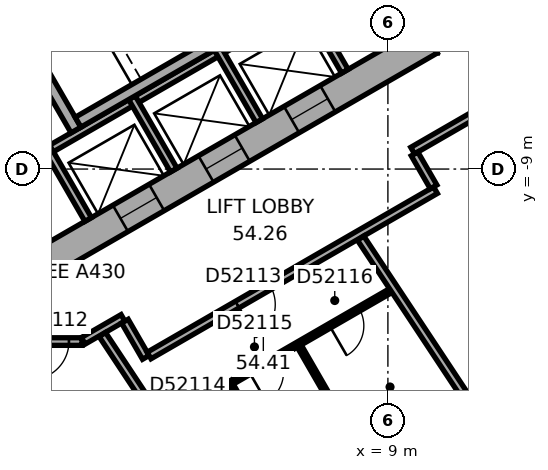
"""IFC4 building model, lengths in metres.
Left out: names, types, materials, properties, quantities, classifications, styles, units other than length and angle.
Written with IfcOpenShell. Run it as: python <this file> out.ifc"""

import sys

from ifc_helpers import new_model, si_unit, direction, frame, frame_2d, origin, place, context, subcontext, project, spatial, rectangle, extrude, element, fill, save


model = new_model("IFC4")
c1 = context("Model", 3, precision=1e-05, world=origin(), true_north=direction((0.0, 1.0)))
c2 = subcontext(c1, "Body", "Model", "MODEL_VIEW")
j1 = project(units=[si_unit("LENGTHUNIT", "METRE"), si_unit("PLANEANGLEUNIT", "RADIAN")], contexts=[c1])
p1 = place(None, origin())
s1 = spatial("IfcSite", under=j1, at=p1, CompositionType="ELEMENT")
p2 = place(p1, origin())
s2 = spatial("IfcBuilding", under=s1, at=p2, CompositionType="ELEMENT")
p3 = place(p2, frame((0.0, 0.0, 221.7)))
s3 = spatial("IfcBuildingStorey", under=s2, at=p3, CompositionType="ELEMENT", Elevation=221.7)
p4 = place(p3, frame((9.9, -5.947, 0.0), z_axis=(0.0, 0.0, 1.0), x_axis=(0.0, 1.0, 0.0)))
e1 = element("IfcWall", 1, at=p4, inside=s3, PredefinedType="SHEAR", context=c2, shape_type="SweptSolid", body=[
    extrude(rectangle(XDim=11.894, YDim=0.8, at=frame_2d((5.947, 0.0))), origin(), (0.0, 0.0, 1.0), 3.7),
])
p5 = place(p4, frame((6.147, 0.0, 0.0)))
e2 = element("IfcOpeningElement", 2, at=p5, cuts=e1, PredefinedType="OPENING", context=c2, shape_type="SweptSolid", body=[
    extrude(rectangle(XDim=1.5, YDim=2.1, at=frame_2d((0.75, 1.05))), frame((0.0, 0.41, 0.0), z_axis=(0.0, -1.0, 0.0), x_axis=(1.0, 0.0, 0.0)), (0.0, 0.0, 1.0), 0.82),
])
p6 = place(p4, frame((2.997, 0.0, 0.0)))
e3 = element("IfcOpeningElement", 3, at=p6, cuts=e1, PredefinedType="OPENING", context=c2, shape_type="SweptSolid", body=[
    extrude(rectangle(XDim=0.9, YDim=2.1, at=frame_2d((0.45, 1.05))), frame((0.0, 0.41, 0.0), z_axis=(0.0, -1.0, 0.0), x_axis=(1.0, 0.0, 0.0)), (0.0, 0.0, 1.0), 0.82),
])
p7 = place(p3, frame((-10.1, -5.6, 0.0), z_axis=(0.0, 0.0, 1.0), x_axis=(0.866023897231, -0.500002609418, 0.0)))
e4 = element("IfcWall", 4, at=p7, inside=s3, PredefinedType="SHEAR", context=c2, shape_type="SweptSolid", body=[
    extrude(rectangle(XDim=11.894, YDim=0.8, at=frame_2d((5.947, 0.0))), origin(), (0.0, 0.0, 1.0), 3.7),
])
p8 = place(p7, frame((6.147, 0.0, 0.0)))
e5 = element("IfcOpeningElement", 5, at=p8, cuts=e4, PredefinedType="OPENING", context=c2, shape_type="SweptSolid", body=[
    extrude(rectangle(XDim=1.5, YDim=2.1, at=frame_2d((0.75, 1.05))), frame((0.0, 0.41, 0.0), z_axis=(0.0, -1.0, 0.0), x_axis=(1.0, 0.0, 0.0)), (0.0, 0.0, 1.0), 0.82),
])
p9 = place(p7, frame((1.597, 0.0, 0.0)))
e6 = element("IfcOpeningElement", 6, at=p9, cuts=e4, PredefinedType="OPENING", context=c2, shape_type="SweptSolid", body=[
    extrude(rectangle(XDim=1.1, YDim=2.1, at=frame_2d((0.55, 1.05))), frame((0.0, 0.41, 0.0), z_axis=(0.0, -1.0, 0.0), x_axis=(1.0, 0.0, 0.0)), (0.0, 0.0, 1.0), 0.82),
])
p10 = place(p7, frame((4.197, 0.0, 0.0)))
e7 = element("IfcOpeningElement", 7, at=p10, cuts=e4, PredefinedType="OPENING", context=c2, shape_type="SweptSolid", body=[
    extrude(rectangle(XDim=1.1, YDim=2.1, at=frame_2d((0.55, 1.05))), frame((0.0, 0.41, 0.0), z_axis=(0.0, -1.0, 0.0), x_axis=(1.0, 0.0, 0.0)), (0.0, 0.0, 1.0), 0.82),
])
p11 = place(p3, frame((-0.2, -11.547, 0.0), z_axis=(0.0, 0.0, 1.0), x_axis=(0.866023897231, 0.500002609418, 0.0)))
e8 = element("IfcWall", 8, at=p11, inside=s3, PredefinedType="SHEAR", context=c2, shape_type="SweptSolid", body=[
    extrude(rectangle(XDim=11.894, YDim=0.8, at=frame_2d((5.947, 0.0))), origin(), (0.0, 0.0, 1.0), 3.7),
])
p12 = place(p11, frame((2.497, 0.0, 0.0)))
e9 = element("IfcOpeningElement", 9, at=p12, cuts=e8, PredefinedType="OPENING", context=c2, shape_type="SweptSolid", body=[
    extrude(rectangle(XDim=1.1, YDim=2.1, at=frame_2d((0.55, 1.05))), frame((0.0, 0.41, 0.0), z_axis=(0.0, -1.0, 0.0), x_axis=(1.0, 0.0, 0.0)), (0.0, 0.0, 1.0), 0.82),
])
p13 = place(p11, frame((5.097, 0.0, 0.0)))
e10 = element("IfcOpeningElement", 10, at=p13, cuts=e8, PredefinedType="OPENING", context=c2, shape_type="SweptSolid", body=[
    extrude(rectangle(XDim=1.1, YDim=2.1, at=frame_2d((0.55, 1.05))), frame((0.0, 0.41, 0.0), z_axis=(0.0, -1.0, 0.0), x_axis=(1.0, 0.0, 0.0)), (0.0, 0.0, 1.0), 0.82),
])
p14 = place(p11, frame((7.697, 0.0, 0.0)))
e11 = element("IfcOpeningElement", 11, at=p14, cuts=e8, PredefinedType="OPENING", context=c2, shape_type="SweptSolid", body=[
    extrude(rectangle(XDim=1.1, YDim=2.1, at=frame_2d((0.55, 1.05))), frame((0.0, 0.41, 0.0), z_axis=(0.0, -1.0, 0.0), x_axis=(1.0, 0.0, 0.0)), (0.0, 0.0, 1.0), 0.82),
])
p15 = place(p3, frame((2.739, -22.711, 0.0), z_axis=(0.0, 0.0, 1.0), x_axis=(0.833885723098, 0.551937134838, 0.0)))
e12 = element("IfcWall", 12, at=p15, inside=s3, PredefinedType="STANDARD", context=c2, shape_type="SweptSolid", body=[
    extrude(rectangle(XDim=18.841, YDim=0.2, at=frame_2d((9.421, 0.0))), origin(), (0.0, 0.0, 1.0), 3.7),
])
p16 = place(p15, frame((1.252, 0.0, 0.9)))
e13 = element("IfcOpeningElement", 13, at=p16, cuts=e12, PredefinedType="OPENING", context=c2, shape_type="SweptSolid", body=[
    extrude(rectangle(XDim=2.2, YDim=2.0, at=frame_2d((1.1, 1.0))), frame((0.0, 0.11, 0.0), z_axis=(0.0, -1.0, 0.0), x_axis=(1.0, 0.0, 0.0)), (0.0, 0.0, 1.0), 0.22),
])
p17 = place(p15, frame((4.786, 0.0, 0.9)))
e14 = element("IfcOpeningElement", 14, at=p17, cuts=e12, PredefinedType="OPENING", context=c2, shape_type="SweptSolid", body=[
    extrude(rectangle(XDim=2.2, YDim=2.0, at=frame_2d((1.1, 1.0))), frame((0.0, 0.11, 0.0), z_axis=(0.0, -1.0, 0.0), x_axis=(1.0, 0.0, 0.0)), (0.0, 0.0, 1.0), 0.22),
])
p18 = place(p15, frame((8.32, 0.0, 0.9)))
e15 = element("IfcOpeningElement", 15, at=p18, cuts=e12, PredefinedType="OPENING", context=c2, shape_type="SweptSolid", body=[
    extrude(rectangle(XDim=2.2, YDim=2.0, at=frame_2d((1.1, 1.0))), frame((0.0, 0.11, 0.0), z_axis=(0.0, -1.0, 0.0), x_axis=(1.0, 0.0, 0.0)), (0.0, 0.0, 1.0), 0.22),
])
p19 = place(p15, frame((11.854, 0.0, 0.9)))
e16 = element("IfcOpeningElement", 16, at=p19, cuts=e12, PredefinedType="OPENING", context=c2, shape_type="SweptSolid", body=[
    extrude(rectangle(XDim=2.2, YDim=2.0, at=frame_2d((1.1, 1.0))), frame((0.0, 0.11, 0.0), z_axis=(0.0, -1.0, 0.0), x_axis=(1.0, 0.0, 0.0)), (0.0, 0.0, 1.0), 0.22),
])
p20 = place(p15, frame((15.387, 0.0, 0.9)))
e17 = element("IfcOpeningElement", 17, at=p20, cuts=e12, PredefinedType="OPENING", context=c2, shape_type="SweptSolid", body=[
    extrude(rectangle(XDim=2.2, YDim=2.0, at=frame_2d((1.1, 1.0))), frame((0.0, 0.11, 0.0), z_axis=(0.0, -1.0, 0.0), x_axis=(1.0, 0.0, 0.0)), (0.0, 0.0, 1.0), 0.22),
])
p21 = place(p3, frame((-0.024, -8.559, 0.0), z_axis=(0.0, 0.0, 1.0), x_axis=(0.866026010844, 0.49999894854, 0.0)))
e18 = element("IfcWall", 18, at=p21, inside=s3, PredefinedType="PARTITIONING", context=c2, shape_type="SweptSolid", body=[
    extrude(rectangle(XDim=8.0, YDim=0.2, at=frame_2d((4.0, 0.0))), origin(), (0.0, 0.0, 1.0), 3.42),
])
for number, where, z_axis, x_axis in (
    (19, (0.013, -8.422, 0.0), (0.0, 0.0, 1.0), (0.5, -0.866, 0.0)),
    (20, (2.264, -7.122, 0.0), (0.0, 0.0, 1.0), (0.5, -0.866, 0.0)),
    (21, (4.516, -5.822, 0.0), (0.0, 0.0, 1.0), (0.5, -0.866, 0.0)),
    (22, (6.768, -4.522, 0.0), (0.0, 0.0, 1.0), (0.5, -0.866, 0.0)),
):
    element("IfcWall", number, at=place(p3, frame(where, z_axis=z_axis, x_axis=x_axis)), inside=s3, PredefinedType="PARTITIONING", context=c2, shape_type="SweptSolid", body=[
        extrude(rectangle(XDim=2.2, YDim=0.2, at=frame_2d((1.1, 0.0))), origin(), (0.0, 0.0, 1.0), 3.42),
    ])
p22 = place(p3, frame((-1.558, -3.902, 0.0), z_axis=(0.0, 0.0, 1.0), x_axis=(0.499977259774, -0.866038532462, 0.0)))
e23 = element("IfcWall", 23, at=p22, inside=s3, PredefinedType="SHEAR", context=c2, shape_type="SweptSolid", body=[
    extrude(rectangle(XDim=4.7, YDim=0.3, at=frame_2d((2.35, 0.0))), origin(), (0.0, 0.0, 1.0), 3.42),
])
p23 = place(p22, frame((0.8, 0.0, 0.0)))
e24 = element("IfcOpeningElement", 24, at=p23, cuts=e23, PredefinedType="OPENING", context=c2, shape_type="SweptSolid", body=[
    extrude(rectangle(XDim=1.2, YDim=2.1, at=frame_2d((0.6, 1.05))), frame((0.0, 0.16, 0.0), z_axis=(0.0, -1.0, 0.0), x_axis=(1.0, 0.0, 0.0)), (0.0, 0.0, 1.0), 0.32),
])
p24 = place(p3, frame((0.847, -7.767, 0.0), z_axis=(0.0, 0.0, 1.0), x_axis=(0.866027801685, 0.499995846692, 0.0)))
e25 = element("IfcWall", 25, at=p24, inside=s3, PredefinedType="SHEAR", context=c2, shape_type="SweptSolid", body=[
    extrude(rectangle(XDim=7.06, YDim=0.3, at=frame_2d((3.53, 0.0))), origin(), (0.0, 0.0, 1.0), 3.42),
])
p25 = place(p3, frame((-0.736, -13.539, 0.0), z_axis=(0.0, 0.0, 1.0), x_axis=(1.0, 0.0, 0.0)))
e26 = element("IfcWall", 26, at=p25, inside=s3, PredefinedType="PARTITIONING", context=c2, shape_type="SweptSolid", body=[
    extrude(rectangle(XDim=1.686, YDim=0.2, at=frame_2d((0.843, 0.0))), origin(), (0.0, 0.0, 1.0), 3.42),
])
p26 = place(p25, frame((0.343, 0.0, 0.0)))
e27 = element("IfcOpeningElement", 27, at=p26, cuts=e26, PredefinedType="OPENING", context=c2, shape_type="SweptSolid", body=[
    extrude(rectangle(XDim=1.0, YDim=2.1, at=frame_2d((0.5, 1.05))), frame((0.0, 0.11, 0.0), z_axis=(0.0, -1.0, 0.0), x_axis=(1.0, 0.0, 0.0)), (0.0, 0.0, 1.0), 0.22),
])
p27 = place(p3, frame((0.985, -13.519, 0.0), z_axis=(0.0, 0.0, 1.0), x_axis=(0.866054082991, 0.499950322867, 0.0)))
e28 = element("IfcWall", 28, at=p27, inside=s3, PredefinedType="PARTITIONING", context=c2, shape_type="SweptSolid", body=[
    extrude(rectangle(XDim=1.206, YDim=0.2, at=frame_2d((0.603, 0.0))), origin(), (0.0, 0.0, 1.0), 3.42),
])
p28 = place(p3, frame((2.079, -13.003, 0.0), z_axis=(0.0, 0.0, 1.0), x_axis=(0.500074377092, -0.865982457891, 0.0)))
e29 = element("IfcWall", 29, at=p28, inside=s3, PredefinedType="PARTITIONING", context=c2, shape_type="SweptSolid", body=[
    extrude(rectangle(XDim=1.101, YDim=0.2, at=frame_2d((0.55, 0.0))), origin(), (0.0, 0.0, 1.0), 3.42),
])
p29 = place(p3, frame((2.716, -13.906, 0.0), z_axis=(0.0, 0.0, 1.0), x_axis=(0.866040290674, 0.499974214264, 0.0)))
e30 = element("IfcWall", 30, at=p29, inside=s3, PredefinedType="PARTITIONING", context=c2, shape_type="SweptSolid", body=[
    extrude(rectangle(XDim=8.702, YDim=0.2, at=frame_2d((4.351, 0.0))), origin(), (0.0, 0.0, 1.0), 3.42),
])
p30 = place(p29, frame((2.679, 0.0, 0.0)))
e31 = element("IfcOpeningElement", 31, at=p30, cuts=e30, PredefinedType="OPENING", context=c2, shape_type="SweptSolid", body=[
    extrude(rectangle(XDim=1.0, YDim=2.1, at=frame_2d((0.5, 1.05))), frame((0.0, 0.11, 0.0), z_axis=(0.0, -1.0, 0.0), x_axis=(1.0, 0.0, 0.0)), (0.0, 0.0, 1.0), 0.22),
])
p31 = place(p3, frame((3.117, -15.638, 0.0), z_axis=(0.0, 0.0, 1.0), x_axis=(0.866031365477, 0.499989673903, 0.0)))
e32 = element("IfcWall", 32, at=p31, inside=s3, PredefinedType="PARTITIONING", context=c2, shape_type="SweptSolid", body=[
    extrude(rectangle(XDim=6.881, YDim=0.12, at=frame_2d((3.44, 0.0))), origin(), (0.0, 0.0, 1.0), 3.42),
])
p32 = place(p31, frame((0.5, 0.0, 0.0)))
e33 = element("IfcOpeningElement", 33, at=p32, cuts=e32, PredefinedType="OPENING", context=c2, shape_type="SweptSolid", body=[
    extrude(rectangle(XDim=1.0, YDim=2.1, at=frame_2d((0.5, 1.05))), frame((0.0, 0.07, 0.0), z_axis=(0.0, -1.0, 0.0), x_axis=(1.0, 0.0, 0.0)), (0.0, 0.0, 1.0), 0.14),
])
p33 = place(p31, frame((2.583, 0.0, 0.0)))
e34 = element("IfcOpeningElement", 34, at=p33, cuts=e32, PredefinedType="OPENING", context=c2, shape_type="SweptSolid", body=[
    extrude(rectangle(XDim=0.9, YDim=2.1, at=frame_2d((0.45, 1.05))), frame((0.0, 0.07, 0.0), z_axis=(0.0, -1.0, 0.0), x_axis=(1.0, 0.0, 0.0)), (0.0, 0.0, 1.0), 0.14),
])
p34 = place(p31, frame((5.023, 0.0, 0.0)))
e35 = element("IfcOpeningElement", 35, at=p34, cuts=e32, PredefinedType="OPENING", context=c2, shape_type="SweptSolid", body=[
    extrude(rectangle(XDim=0.9, YDim=2.1, at=frame_2d((0.45, 1.05))), frame((0.0, 0.07, 0.0), z_axis=(0.0, -1.0, 0.0), x_axis=(1.0, 0.0, 0.0)), (0.0, 0.0, 1.0), 0.14),
])
p35 = place(p3, frame((5.677, -19.687, 0.0), z_axis=(0.0, 0.0, 1.0), x_axis=(-0.551936619203, 0.833886064389, 0.0)))
e36 = element("IfcWall", 36, at=p35, inside=s3, PredefinedType="PARTITIONING", context=c2, shape_type="SweptSolid", body=[
    extrude(rectangle(XDim=7.592, YDim=0.2, at=frame_2d((3.796, 0.0))), origin(), (0.0, 0.0, 1.0), 3.42),
])
p36 = place(p3, frame((6.169, -16.924, 0.0), z_axis=(0.0, 0.0, 1.0), x_axis=(-0.500047388771, 0.865998042136, 0.0)))
e37 = element("IfcWall", 37, at=p36, inside=s3, PredefinedType="PARTITIONING", context=c2, shape_type="SweptSolid", body=[
    extrude(rectangle(XDim=2.58, YDim=0.12, at=frame_2d((1.29, 0.0))), origin(), (0.0, 0.0, 1.0), 3.42),
])
p37 = place(p3, frame((8.912, -17.545, 0.0), z_axis=(0.0, 0.0, 1.0), x_axis=(-0.500022113525, 0.866012636158, 0.0)))
e38 = element("IfcWall", 38, at=p37, inside=s3, PredefinedType="PARTITIONING", context=c2, shape_type="SweptSolid", body=[
    extrude(rectangle(XDim=4.49, YDim=0.12, at=frame_2d((2.245, 0.0))), origin(), (0.0, 0.0, 1.0), 2.87),
])
p38 = place(p3, frame((9.652, -8.515, 0.0), z_axis=(0.0, 0.0, 1.0), x_axis=(0.866020375458, 0.500008709215, 0.0)))
e39 = element("IfcWall", 39, at=p38, inside=s3, PredefinedType="PARTITIONING", context=c2, shape_type="SweptSolid", body=[
    extrude(rectangle(XDim=1.846, YDim=0.2, at=frame_2d((0.923, 0.0))), origin(), (0.0, 0.0, 1.0), 3.42),
])
p39 = place(p3, frame((10.202, -9.469, 0.0), z_axis=(0.0, 0.0, 1.0), x_axis=(-0.499968756647, 0.866043441391, 0.0)))
e40 = element("IfcWall", 40, at=p39, inside=s3, PredefinedType="PARTITIONING", context=c2, shape_type="SweptSolid", body=[
    extrude(rectangle(XDim=1.001, YDim=0.2, at=frame_2d((0.5, 0.0))), origin(), (0.0, 0.0, 1.0), 3.42),
])
p40 = place(p3, frame((11.571, -15.786, 0.0), z_axis=(0.0, 0.0, 1.0), x_axis=(-0.551944861763, 0.833880608705, 0.0)))
e41 = element("IfcWall", 41, at=p40, inside=s3, PredefinedType="PARTITIONING", context=c2, shape_type="SweptSolid", body=[
    extrude(rectangle(XDim=5.957, YDim=0.2, at=frame_2d((2.979, 0.0))), origin(), (0.0, 0.0, 1.0), 3.42),
])
p41 = place(p12, origin())
e42 = element("IfcDoor", 42, at=p41, inside=s3, OperationType="DOUBLE_DOOR_SLIDING", PredefinedType="DOOR", context=c2, shape_type="SweptSolid", body=[
    extrude(rectangle(XDim=1.1, YDim=2.1, at=frame_2d((0.55, 1.05))), frame((0.0, 0.025, 0.0), z_axis=(0.0, -1.0, 0.0), x_axis=(1.0, 0.0, 0.0)), (0.0, 0.0, 1.0), 0.05),
])
fill(e9, e42)
p42 = place(p13, origin())
e43 = element("IfcDoor", 43, at=p42, inside=s3, OperationType="DOUBLE_DOOR_SLIDING", PredefinedType="DOOR", context=c2, shape_type="SweptSolid", body=[
    extrude(rectangle(XDim=1.1, YDim=2.1, at=frame_2d((0.55, 1.05))), frame((0.0, 0.025, 0.0), z_axis=(0.0, -1.0, 0.0), x_axis=(1.0, 0.0, 0.0)), (0.0, 0.0, 1.0), 0.05),
])
fill(e10, e43)
p43 = place(p14, origin())
e44 = element("IfcDoor", 44, at=p43, inside=s3, OperationType="DOUBLE_DOOR_SLIDING", PredefinedType="DOOR", context=c2, shape_type="SweptSolid", body=[
    extrude(rectangle(XDim=1.1, YDim=2.1, at=frame_2d((0.55, 1.05))), frame((0.0, 0.025, 0.0), z_axis=(0.0, -1.0, 0.0), x_axis=(1.0, 0.0, 0.0)), (0.0, 0.0, 1.0), 0.05),
])
fill(e11, e44)
p44 = place(p26, origin())
e45 = element("IfcDoor", 45, at=p44, inside=s3, OperationType="SINGLE_SWING_LEFT", PredefinedType="DOOR", context=c2, shape_type="SweptSolid", body=[
    extrude(rectangle(XDim=1.0, YDim=2.1, at=frame_2d((0.5, 1.05))), frame((0.0, 0.025, 0.0), z_axis=(0.0, -1.0, 0.0), x_axis=(1.0, 0.0, 0.0)), (0.0, 0.0, 1.0), 0.05),
])
fill(e27, e45)
p45 = place(p30, origin())
e46 = element("IfcDoor", 46, at=p45, inside=s3, OperationType="SINGLE_SWING_LEFT", PredefinedType="DOOR", context=c2, shape_type="SweptSolid", body=[
    extrude(rectangle(XDim=1.0, YDim=2.1, at=frame_2d((0.5, 1.05))), frame((0.0, 0.025, 0.0), z_axis=(0.0, -1.0, 0.0), x_axis=(1.0, 0.0, 0.0)), (0.0, 0.0, 1.0), 0.05),
])
fill(e31, e46)
p46 = place(p33, origin())
e47 = element("IfcDoor", 47, at=p46, inside=s3, OperationType="SINGLE_SWING_LEFT", PredefinedType="DOOR", context=c2, shape_type="SweptSolid", body=[
    extrude(rectangle(XDim=0.9, YDim=2.1, at=frame_2d((0.45, 1.05))), frame((0.0, 0.025, 0.0), z_axis=(0.0, -1.0, 0.0), x_axis=(1.0, 0.0, 0.0)), (0.0, 0.0, 1.0), 0.05),
])
fill(e34, e47)
p47 = place(p34, origin())
e48 = element("IfcDoor", 48, at=p47, inside=s3, OperationType="SINGLE_SWING_LEFT", PredefinedType="DOOR", context=c2, shape_type="SweptSolid", body=[
    extrude(rectangle(XDim=0.9, YDim=2.1, at=frame_2d((0.45, 1.05))), frame((0.0, 0.025, 0.0), z_axis=(0.0, -1.0, 0.0), x_axis=(1.0, 0.0, 0.0)), (0.0, 0.0, 1.0), 0.05),
])
fill(e35, e48)
save(model, sys.argv[1])
